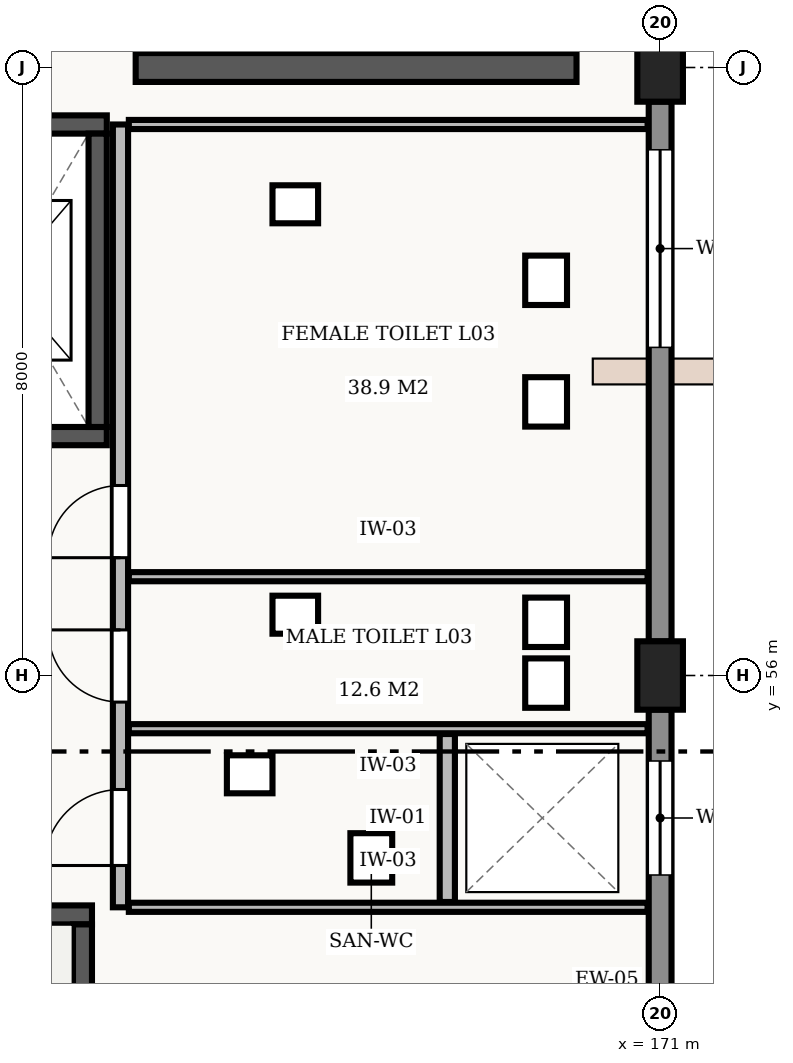
"""IFC4 building model, lengths in metres.
Left out: names, types, materials, properties, quantities, classifications, styles, units other than length and angle.
Written with IfcOpenShell. Run it as: python <this file> out.ifc"""

import sys

from ifc_helpers import new_model, si_unit, direction, frame, frame_2d, origin, origin_2d, place, context, subcontext, project, spatial, rectangle, extrude, element, fill, save


model = new_model("IFC4")
c1 = context("Model", 3, precision=1e-05, world=origin(), true_north=direction((0.0, 1.0)))
c2 = subcontext(c1, "Body", "Model", "MODEL_VIEW")
j1 = project(units=[si_unit("LENGTHUNIT", "METRE"), si_unit("PLANEANGLEUNIT", "RADIAN")], contexts=[c1])
p1 = place(None, origin())
s1 = spatial("IfcSite", under=j1, at=p1, CompositionType="ELEMENT")
p2 = place(p1, origin())
s2 = spatial("IfcBuilding", under=s1, at=p2, CompositionType="ELEMENT")
p3 = place(p2, frame((0.0, 0.0, 14.4)))
s3 = spatial("IfcBuildingStorey", under=s2, at=p3, CompositionType="ELEMENT", Elevation=14.4)
for number, where, z_axis, x_axis in (
    (1, (171.0, 56.0, 0.0), (0.0, 0.0, 1.0), (1.0, 0.0, 0.0)),
    (2, (171.0, 64.0, 0.0), (0.0, 0.0, 1.0), (1.0, 0.0, 0.0)),
):
    element("IfcColumn", number, at=place(p3, frame(where, z_axis=z_axis, x_axis=x_axis)), inside=s3, PredefinedType="COLUMN", context=c2, shape_type="SweptSolid", body=[
        extrude(rectangle(XDim=0.6, YDim=0.9, at=origin_2d()), origin(), (0.0, 0.0, 1.0), 4.2),
    ])
p4 = place(p3, frame((171.0, 63.552, 0.0), z_axis=(0.0, 0.0, 1.0), x_axis=(0.0, -1.0, 0.0)))
e3 = element("IfcWall", 3, at=p4, inside=s3, PredefinedType="STANDARD", context=c2, shape_type="SweptSolid", body=[
    extrude(rectangle(XDim=7.104, YDim=0.3, at=frame_2d((3.552, 0.0))), origin(), (0.0, 0.0, 1.0), 3.43),
])
p5 = place(p4, frame((0.635, 0.0, 0.9)))
e4 = element("IfcOpeningElement", 4, at=p5, cuts=e3, PredefinedType="OPENING", context=c2, shape_type="SweptSolid", body=[
    extrude(rectangle(XDim=2.6, YDim=1.6, at=frame_2d((1.3, 0.8))), frame((0.0, 0.162, 0.0), z_axis=(0.0, -1.0, 0.0), x_axis=(1.0, 0.0, 0.0)), (0.0, 0.0, 1.0), 0.324),
])
p6 = place(p3, frame((171.0, 55.552, 0.0), z_axis=(0.0, 0.0, 1.0), x_axis=(0.0, -1.0, 0.0)))
e5 = element("IfcWall", 5, at=p6, inside=s3, PredefinedType="STANDARD", context=c2, shape_type="SweptSolid", body=[
    extrude(rectangle(XDim=7.104, YDim=0.3, at=frame_2d((3.552, 0.0))), origin(), (0.0, 0.0, 1.0), 3.38),
])
p7 = place(p6, frame((0.677, 0.0, 0.9)))
e6 = element("IfcOpeningElement", 6, at=p7, cuts=e5, PredefinedType="OPENING", context=c2, shape_type="SweptSolid", body=[
    extrude(rectangle(XDim=1.5, YDim=2.1, at=frame_2d((0.75, 1.05))), frame((0.0, 0.162, 0.0), z_axis=(0.0, -1.0, 0.0), x_axis=(1.0, 0.0, 0.0)), (0.0, 0.0, 1.0), 0.324),
])
p8 = place(p6, frame((4.236, 0.0, 0.9)))
e7 = element("IfcOpeningElement", 7, at=p8, cuts=e5, PredefinedType="OPENING", context=c2, shape_type="SweptSolid", body=[
    extrude(rectangle(XDim=1.5, YDim=2.1, at=frame_2d((0.75, 1.05))), frame((0.0, 0.162, 0.0), z_axis=(0.0, -1.0, 0.0), x_axis=(1.0, 0.0, 0.0)), (0.0, 0.0, 1.0), 0.324),
])
p9 = place(p3, frame((163.525, 52.85, 0.0), z_axis=(0.0, 0.0, 1.0), x_axis=(-1.0, 0.0, 0.0)))
e8 = element("IfcWall", 8, at=p9, inside=s3, PredefinedType="SHEAR", context=c2, shape_type="SweptSolid", body=[
    extrude(rectangle(XDim=9.65, YDim=0.25, at=frame_2d((4.825, 0.0))), origin(), (0.0, 0.0, 1.0), 3.9),
])
p10 = place(p9, frame((7.925, 0.0, 0.0)))
e9 = element("IfcOpeningElement", 9, at=p10, cuts=e8, PredefinedType="OPENING", context=c2, shape_type="SweptSolid", body=[
    extrude(rectangle(XDim=1.25, YDim=2.15, at=frame_2d((0.625, 1.075))), frame((0.0, 0.137, 0.0), z_axis=(0.0, -1.0, 0.0), x_axis=(1.0, 0.0, 0.0)), (0.0, 0.0, 1.0), 0.274),
])
p11 = place(p3, frame((163.4, 48.875, 0.0), z_axis=(0.0, 0.0, 1.0), x_axis=(0.0, 1.0, 0.0)))
e10 = element("IfcWall", 10, at=p11, inside=s3, PredefinedType="SHEAR", context=c2, shape_type="SweptSolid", body=[
    extrude(rectangle(XDim=3.85, YDim=0.25, at=frame_2d((1.925, 0.0))), origin(), (0.0, 0.0, 1.0), 3.9),
])
p12 = place(p3, frame((160.975, 59.15, 0.0), z_axis=(0.0, 0.0, 1.0), x_axis=(1.0, 0.0, 0.0)))
e11 = element("IfcWall", 11, at=p12, inside=s3, PredefinedType="SHEAR", context=c2, shape_type="SweptSolid", body=[
    extrude(rectangle(XDim=2.745, YDim=0.24, at=frame_2d((1.373, 0.0))), origin(), (0.0, 0.0, 1.0), 3.9),
])
p13 = place(p12, frame((0.825, 0.0, 0.0)))
e12 = element("IfcOpeningElement", 12, at=p13, cuts=e11, PredefinedType="OPENING", context=c2, shape_type="SweptSolid", body=[
    extrude(rectangle(XDim=1.1, YDim=2.2, at=frame_2d((0.55, 1.1))), frame((0.0, 0.132, 0.0), z_axis=(0.0, -1.0, 0.0), x_axis=(1.0, 0.0, 0.0)), (0.0, 0.0, 1.0), 0.264),
])
p14 = place(p3, frame((163.72, 63.25, 0.0), z_axis=(0.0, 0.0, 1.0), x_axis=(-1.0, 0.0, 0.0)))
e13 = element("IfcWall", 13, at=p14, inside=s3, PredefinedType="SHEAR", context=c2, shape_type="SweptSolid", body=[
    extrude(rectangle(XDim=2.745, YDim=0.24, at=frame_2d((1.373, 0.0))), origin(), (0.0, 0.0, 1.0), 3.9),
])
p15 = place(p3, frame((163.6, 59.27, 0.0), z_axis=(0.0, 0.0, 1.0), x_axis=(0.0, 1.0, 0.0)))
e14 = element("IfcWall", 14, at=p15, inside=s3, PredefinedType="SHEAR", context=c2, shape_type="SweptSolid", body=[
    extrude(rectangle(XDim=3.86, YDim=0.24, at=frame_2d((1.93, 0.0))), origin(), (0.0, 0.0, 1.0), 3.9),
])
p16 = place(p3, frame((164.1, 64.0, 0.0), z_axis=(0.0, 0.0, 1.0), x_axis=(1.0, 0.0, 0.0)))
e15 = element("IfcWall", 15, at=p16, inside=s3, PredefinedType="SHEAR", context=c2, shape_type="SweptSolid", body=[
    extrude(rectangle(XDim=5.8, YDim=0.38, at=frame_2d((2.9, 0.0))), origin(), (0.0, 0.0, 1.0), 2.95),
])
p17 = place(p3, frame((163.9, 52.95, 0.0), z_axis=(0.0, 0.0, 1.0), x_axis=(0.0, 1.0, 0.0)))
e16 = element("IfcWall", 16, at=p17, inside=s3, PredefinedType="STANDARD", context=c2, shape_type="SweptSolid", body=[
    extrude(rectangle(XDim=10.3, YDim=0.2, at=frame_2d((5.15, 0.0))), origin(), (0.0, 0.0, 1.0), 3.9),
])
p18 = place(p17, frame((0.55, 0.0, 0.0)))
e17 = element("IfcOpeningElement", 17, at=p18, cuts=e16, PredefinedType="OPENING", context=c2, shape_type="SweptSolid", body=[
    extrude(rectangle(XDim=1.0, YDim=2.1, at=frame_2d((0.5, 1.05))), frame((0.0, 0.112, 0.0), z_axis=(0.0, -1.0, 0.0), x_axis=(1.0, 0.0, 0.0)), (0.0, 0.0, 1.0), 0.224),
])
p19 = place(p17, frame((2.7, 0.0, 0.0)))
e18 = element("IfcOpeningElement", 18, at=p19, cuts=e16, PredefinedType="OPENING", context=c2, shape_type="SweptSolid", body=[
    extrude(rectangle(XDim=0.95, YDim=2.1, at=frame_2d((0.475, 1.05))), frame((0.0, 0.112, 0.0), z_axis=(0.0, -1.0, 0.0), x_axis=(1.0, 0.0, 0.0)), (0.0, 0.0, 1.0), 0.224),
])
p20 = place(p17, frame((4.6, 0.0, 0.0)))
e19 = element("IfcOpeningElement", 19, at=p20, cuts=e16, PredefinedType="OPENING", context=c2, shape_type="SweptSolid", body=[
    extrude(rectangle(XDim=0.95, YDim=2.1, at=frame_2d((0.475, 1.05))), frame((0.0, 0.112, 0.0), z_axis=(0.0, -1.0, 0.0), x_axis=(1.0, 0.0, 0.0)), (0.0, 0.0, 1.0), 0.224),
])
p21 = place(p3, frame((168.2, 53.02, 0.0), z_axis=(0.0, 0.0, 1.0), x_axis=(0.0, 1.0, 0.0)))
e20 = element("IfcWall", 20, at=p21, inside=s3, PredefinedType="STANDARD", context=c2, shape_type="SweptSolid", body=[
    extrude(rectangle(XDim=2.21, YDim=0.2, at=frame_2d((1.105, 0.0))), origin(), (0.0, 0.0, 1.0), 3.9),
])
for number, where, z_axis, x_axis in (
    (21, (164.01, 52.95, 0.0), (0.0, 0.0, 1.0), (1.0, 0.0, 0.0)),
    (22, (164.01, 55.3, 0.0), (0.0, 0.0, 1.0), (1.0, 0.0, 0.0)),
    (23, (164.01, 57.3, 0.0), (0.0, 0.0, 1.0), (1.0, 0.0, 0.0)),
    (24, (164.01, 63.25, 0.0), (0.0, 0.0, 1.0), (1.0, 0.0, 0.0)),
):
    element("IfcWall", number, at=place(p3, frame(where, z_axis=z_axis, x_axis=x_axis)), inside=s3, PredefinedType="STANDARD", context=c2, shape_type="SweptSolid", body=[
        extrude(rectangle(XDim=6.825, YDim=0.12, at=frame_2d((3.413, 0.0))), origin(), (0.0, 0.0, 1.0), 3.9),
    ])
p22 = place(p5, origin())
e25 = element("IfcWindow", 25, at=p22, inside=s3, PartitioningType="SINGLE_PANEL", PredefinedType="WINDOW", context=c2, shape_type="SweptSolid", body=[
    extrude(rectangle(XDim=2.6, YDim=1.6, at=frame_2d((1.3, 0.8))), frame((0.0, 0.03, 0.0), z_axis=(0.0, -1.0, 0.0), x_axis=(1.0, 0.0, 0.0)), (0.0, 0.0, 1.0), 0.06),
])
fill(e4, e25)
p23 = place(p7, origin())
e26 = element("IfcWindow", 26, at=p23, inside=s3, PartitioningType="SINGLE_PANEL", PredefinedType="WINDOW", context=c2, shape_type="SweptSolid", body=[
    extrude(rectangle(XDim=1.5, YDim=2.1, at=frame_2d((0.75, 1.05))), frame((0.0, 0.03, 0.0), z_axis=(0.0, -1.0, 0.0), x_axis=(1.0, 0.0, 0.0)), (0.0, 0.0, 1.0), 0.06),
])
fill(e6, e26)
p24 = place(p18, origin())
e27 = element("IfcDoor", 27, at=p24, inside=s3, OperationType="SINGLE_SWING_LEFT", PredefinedType="DOOR", context=c2, shape_type="SweptSolid", body=[
    extrude(rectangle(XDim=1.0, YDim=2.1, at=frame_2d((0.5, 1.05))), frame((0.0, 0.025, 0.0), z_axis=(0.0, -1.0, 0.0), x_axis=(1.0, 0.0, 0.0)), (0.0, 0.0, 1.0), 0.05),
])
fill(e17, e27)
p25 = place(p19, origin())
e28 = element("IfcDoor", 28, at=p25, inside=s3, OperationType="SINGLE_SWING_RIGHT", PredefinedType="DOOR", context=c2, shape_type="SweptSolid", body=[
    extrude(rectangle(XDim=0.95, YDim=2.1, at=frame_2d((0.475, 1.05))), frame((0.0, 0.025, 0.0), z_axis=(0.0, -1.0, 0.0), x_axis=(1.0, 0.0, 0.0)), (0.0, 0.0, 1.0), 0.05),
])
fill(e18, e28)
p26 = place(p20, origin())
e29 = element("IfcDoor", 29, at=p26, inside=s3, OperationType="SINGLE_SWING_LEFT", PredefinedType="DOOR", context=c2, shape_type="SweptSolid", body=[
    extrude(rectangle(XDim=0.95, YDim=2.1, at=frame_2d((0.475, 1.05))), frame((0.0, 0.025, 0.0), z_axis=(0.0, -1.0, 0.0), x_axis=(1.0, 0.0, 0.0)), (0.0, 0.0, 1.0), 0.05),
])
fill(e19, e29)
save(model, sys.argv[1])
